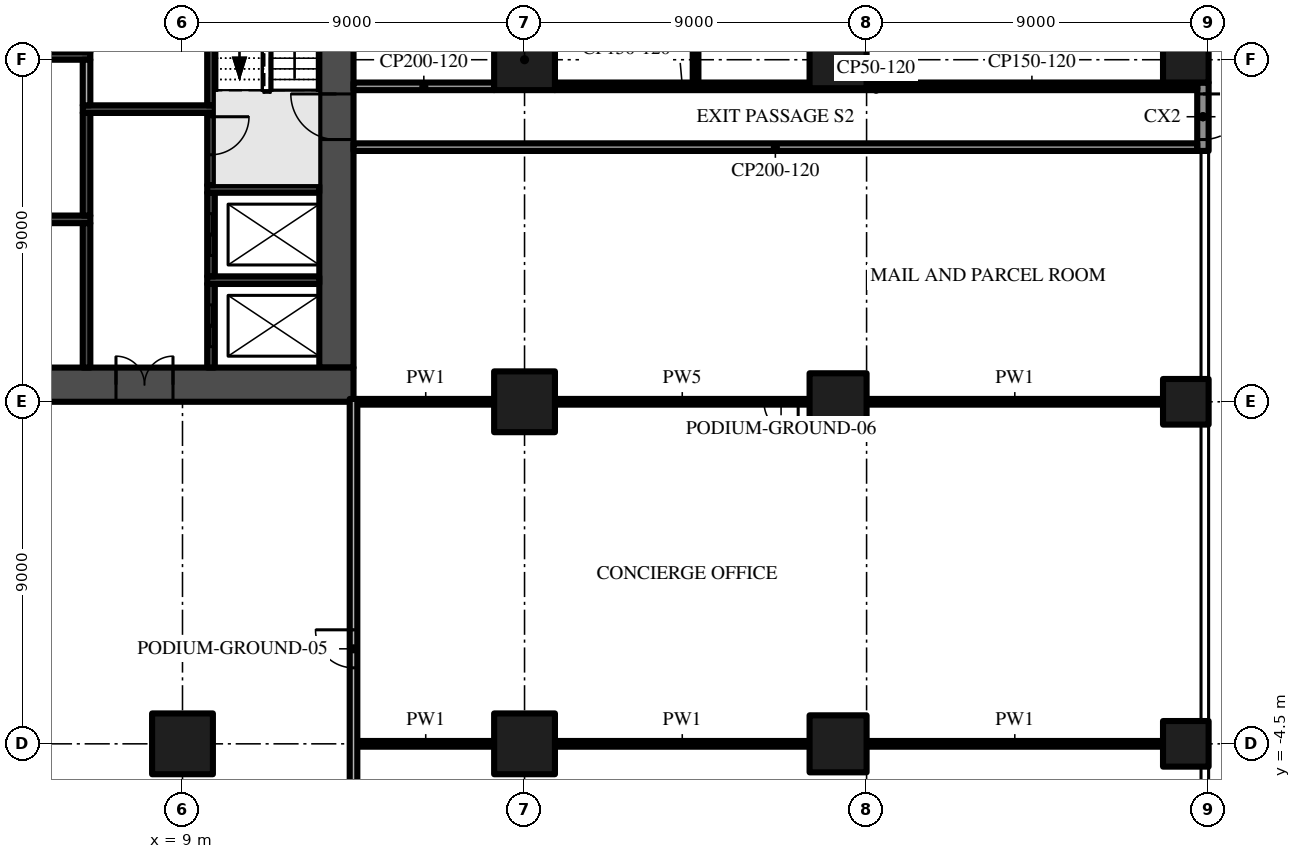
"""IFC4 building model, lengths in metres.
Left out: names, types, materials, properties, quantities, classifications, styles, units other than length and angle.
Written with IfcOpenShell. Run it as: python <this file> out.ifc"""

import sys

from ifc_helpers import new_model, si_unit, direction, frame, frame_2d, origin, origin_2d, place, context, subcontext, project, spatial, rectangle, extrude, element, fill, save


model = new_model("IFC4")
c1 = context("Model", 3, precision=1e-05, world=origin(), true_north=direction((0.0, 1.0)))
c2 = subcontext(c1, "Body", "Model", "MODEL_VIEW")
j1 = project(units=[si_unit("LENGTHUNIT", "METRE"), si_unit("PLANEANGLEUNIT", "RADIAN")], contexts=[c1])
p1 = place(None, origin())
s1 = spatial("IfcSite", under=j1, at=p1, CompositionType="ELEMENT")
p2 = place(p1, origin())
s2 = spatial("IfcBuilding", under=s1, at=p2, CompositionType="ELEMENT")
p3 = place(p2, origin())
s3 = spatial("IfcBuildingStorey", under=s2, at=p3, CompositionType="ELEMENT", Elevation=0.0)
p4 = place(p3, frame((-13.5, 4.95, -2.2), z_axis=(0.0, 0.0, 1.0), x_axis=(1.0, 0.0, 0.0)))
e1 = element("IfcWall", 1, at=p4, inside=s3, PredefinedType="SHEAR", context=c2, shape_type="SweptSolid", body=[
    extrude(rectangle(XDim=27.0, YDim=0.9, at=frame_2d((13.5, 0.0))), origin(), (0.0, 0.0, 1.0), 7.8),
])
p5 = place(p4, frame((12.0, 0.0, 2.2)))
e2 = element("IfcOpeningElement", 2, at=p5, cuts=e1, PredefinedType="OPENING", context=c2, shape_type="SweptSolid", body=[
    extrude(rectangle(XDim=3.0, YDim=2.4, at=frame_2d((1.5, 1.2))), frame((0.0, 0.46, 0.0), z_axis=(0.0, -1.0, 0.0), x_axis=(1.0, 0.0, 0.0)), (0.0, 0.0, 1.0), 0.92),
])
p6 = place(p4, frame((4.9, 0.0, 2.2)))
e3 = element("IfcOpeningElement", 3, at=p6, cuts=e1, PredefinedType="OPENING", context=c2, shape_type="SweptSolid", body=[
    extrude(rectangle(XDim=1.2, YDim=2.2, at=frame_2d((0.6, 1.1))), frame((0.0, 0.46, 0.0), z_axis=(0.0, -1.0, 0.0), x_axis=(1.0, 0.0, 0.0)), (0.0, 0.0, 1.0), 0.92),
])
p7 = place(p4, frame((20.75, 0.0, 2.2)))
e4 = element("IfcOpeningElement", 4, at=p7, cuts=e1, PredefinedType="OPENING", context=c2, shape_type="SweptSolid", body=[
    extrude(rectangle(XDim=1.5, YDim=2.2, at=frame_2d((0.75, 1.1))), frame((0.0, 0.46, 0.0), z_axis=(0.0, -1.0, 0.0), x_axis=(1.0, 0.0, 0.0)), (0.0, 0.0, 1.0), 0.92),
])
p8 = place(p4, frame((17.4, 0.0, 2.2)))
e5 = element("IfcOpeningElement", 5, at=p8, cuts=e1, PredefinedType="OPENING", context=c2, shape_type="SweptSolid", body=[
    extrude(rectangle(XDim=1.2, YDim=2.2, at=frame_2d((0.6, 1.1))), frame((0.0, 0.46, 0.0), z_axis=(0.0, -1.0, 0.0), x_axis=(1.0, 0.0, 0.0)), (0.0, 0.0, 1.0), 0.92),
])
p9 = place(p3, frame((13.05, 5.4, -2.2), z_axis=(0.0, 0.0, 1.0), x_axis=(0.0, 1.0, 0.0)))
e6 = element("IfcWall", 6, at=p9, inside=s3, PredefinedType="SHEAR", context=c2, shape_type="SweptSolid", body=[
    extrude(rectangle(XDim=16.2, YDim=0.9, at=frame_2d((8.1, 0.0))), origin(), (0.0, 0.0, 1.0), 7.8),
])
p10 = place(p9, frame((6.0, 0.0, 2.2)))
e7 = element("IfcOpeningElement", 7, at=p10, cuts=e6, PredefinedType="OPENING", context=c2, shape_type="SweptSolid", body=[
    extrude(rectangle(XDim=1.2, YDim=2.2, at=frame_2d((0.6, 1.1))), frame((0.0, 0.46, 0.0), z_axis=(0.0, -1.0, 0.0), x_axis=(1.0, 0.0, 0.0)), (0.0, 0.0, 1.0), 0.92),
])
for number, where, z_axis, x_axis in (
    (8, (35.4, -4.5, 0.0), (0.0, 0.0, 1.0), (1.0, 0.0, 0.0)),
    (9, (35.4, 13.5, 0.0), (0.0, 0.0, 1.0), (1.0, 0.0, 0.0)),
    (10, (35.4, 4.5, 0.0), (0.0, 0.0, 1.0), (1.0, 0.0, 0.0)),
):
    element("IfcColumn", number, at=place(p3, frame(where, z_axis=z_axis, x_axis=x_axis)), inside=s3, PredefinedType="COLUMN", context=c2, shape_type="SweptSolid", body=[
        extrude(rectangle(XDim=1.2, YDim=1.2, at=origin_2d()), origin(), (0.0, 0.0, 1.0), 5.6),
    ])
for number, where, z_axis, x_axis in (
    (11, (18.0, -4.5, 0.0), (0.0, 0.0, 1.0), (1.0, 0.0, 0.0)),
    (12, (18.0, 13.5, 0.0), (0.0, 0.0, 1.0), (1.0, 0.0, 0.0)),
    (13, (18.0, 4.5, 0.0), (0.0, 0.0, 1.0), (1.0, 0.0, 0.0)),
):
    element("IfcColumn", number, at=place(p3, frame(where, z_axis=z_axis, x_axis=x_axis)), inside=s3, PredefinedType="COLUMN", context=c2, shape_type="SweptSolid", body=[
        extrude(rectangle(XDim=1.6, YDim=1.6, at=origin_2d()), origin(), (0.0, 0.0, 1.0), 5.6),
    ])
for number, where, z_axis, x_axis in (
    (14, (26.25, -4.5, 0.0), (0.0, 0.0, 1.0), (1.0, 0.0, 0.0)),
    (15, (26.25, 13.5, 0.0), (0.0, 0.0, 1.0), (1.0, 0.0, 0.0)),
    (16, (26.25, 4.5, 0.0), (0.0, 0.0, 1.0), (1.0, 0.0, 0.0)),
):
    element("IfcColumn", number, at=place(p3, frame(where, z_axis=z_axis, x_axis=x_axis)), inside=s3, PredefinedType="COLUMN", context=c2, shape_type="SweptSolid", body=[
        extrude(rectangle(XDim=1.5, YDim=1.5, at=origin_2d()), origin(), (0.0, 0.0, 1.0), 5.6),
    ])
p11 = place(p3, frame((9.0, -4.5, 0.0), z_axis=(0.0, 0.0, 1.0), x_axis=(1.0, 0.0, 0.0)))
e17 = element("IfcColumn", 17, at=p11, inside=s3, PredefinedType="COLUMN", context=c2, shape_type="SweptSolid", body=[
    extrude(rectangle(XDim=1.6, YDim=1.6, at=origin_2d()), origin(), (0.0, 0.0, 1.0), 5.6),
])
for number, where, z_axis, x_axis in (
    (18, (1.5, 9.3, -0.4), (0.0, 0.0, 1.0), (1.0, 0.0, 0.0)),
    (19, (1.5, 13.6, -0.4), (0.0, 0.0, 1.0), (1.0, 0.0, 0.0)),
):
    element("IfcWall", number, at=place(p3, frame(where, z_axis=z_axis, x_axis=x_axis)), inside=s3, PredefinedType="SHEAR", context=c2, shape_type="SweptSolid", body=[
        extrude(rectangle(XDim=5.075, YDim=0.2, at=frame_2d((2.538, 0.0))), origin(), (0.0, 0.0, 1.0), 6.0),
    ])
p12 = place(p3, frame((6.475, 5.4, -0.4), z_axis=(0.0, 0.0, 1.0), x_axis=(0.0, 1.0, 0.0)))
e20 = element("IfcWall", 20, at=p12, inside=s3, PredefinedType="SHEAR", context=c2, shape_type="SweptSolid", body=[
    extrude(rectangle(XDim=3.8, YDim=0.2, at=frame_2d((1.9, 0.0))), origin(), (0.0, 0.0, 1.0), 6.0),
])
p13 = place(p3, frame((6.475, 9.4, -0.4), z_axis=(0.0, 0.0, 1.0), x_axis=(0.0, 1.0, 0.0)))
e21 = element("IfcWall", 21, at=p13, inside=s3, PredefinedType="SHEAR", context=c2, shape_type="SweptSolid", body=[
    extrude(rectangle(XDim=2.7, YDim=0.2, at=frame_2d((1.35, 0.0))), origin(), (0.0, 0.0, 1.0), 6.0),
])
p14 = place(p3, frame((6.375, 12.2, -0.4), z_axis=(0.0, 0.0, 1.0), x_axis=(1.0, 0.0, 0.0)))
e22 = element("IfcWall", 22, at=p14, inside=s3, PredefinedType="SHEAR", context=c2, shape_type="SweptSolid", body=[
    extrude(rectangle(XDim=3.475, YDim=0.2, at=frame_2d((1.738, 0.0))), origin(), (0.0, 0.0, 1.0), 6.0),
])
p15 = place(p3, frame((6.475, 12.3, 0.0), z_axis=(0.0, 0.0, 1.0), x_axis=(0.0, 1.0, 0.0)))
e23 = element("IfcWall", 23, at=p15, inside=s3, PredefinedType="PARTITIONING", context=c2, shape_type="SweptSolid", body=[
    extrude(rectangle(XDim=1.2, YDim=0.2, at=frame_2d((0.6, 0.0))), origin(), (0.0, 0.0, 1.0), 5.6),
])
p16 = place(p3, frame((9.75, 5.4, -0.4), z_axis=(0.0, 0.0, 1.0), x_axis=(0.0, 1.0, 0.0)))
e24 = element("IfcWall", 24, at=p16, inside=s3, PredefinedType="SHEAR", context=c2, shape_type="SweptSolid", body=[
    extrude(rectangle(XDim=2.2, YDim=0.2, at=frame_2d((1.1, 0.0))), origin(), (0.0, 0.0, 1.0), 6.0),
])
p17 = place(p16, frame((0.55, 0.0, 0.4)))
e25 = element("IfcOpeningElement", 25, at=p17, cuts=e24, PredefinedType="OPENING", context=c2, shape_type="SweptSolid", body=[
    extrude(rectangle(XDim=1.1, YDim=2.1, at=frame_2d((0.55, 1.05))), frame((0.0, 0.11, 0.0), z_axis=(0.0, -1.0, 0.0), x_axis=(1.0, 0.0, 0.0)), (0.0, 0.0, 1.0), 0.22),
])
p18 = place(p3, frame((9.65, 7.7, -0.4), z_axis=(0.0, 0.0, 1.0), x_axis=(1.0, 0.0, 0.0)))
e26 = element("IfcWall", 26, at=p18, inside=s3, PredefinedType="SHEAR", context=c2, shape_type="SweptSolid", body=[
    extrude(rectangle(XDim=2.95, YDim=0.2, at=frame_2d((1.475, 0.0))), origin(), (0.0, 0.0, 1.0), 6.0),
])
p19 = place(p3, frame((9.75, 7.8, -0.4), z_axis=(0.0, 0.0, 1.0), x_axis=(0.0, 1.0, 0.0)))
e27 = element("IfcWall", 27, at=p19, inside=s3, PredefinedType="SHEAR", context=c2, shape_type="SweptSolid", body=[
    extrude(rectangle(XDim=2.2, YDim=0.2, at=frame_2d((1.1, 0.0))), origin(), (0.0, 0.0, 1.0), 6.0),
])
p20 = place(p19, frame((0.55, 0.0, 0.4)))
e28 = element("IfcOpeningElement", 28, at=p20, cuts=e27, PredefinedType="OPENING", context=c2, shape_type="SweptSolid", body=[
    extrude(rectangle(XDim=1.1, YDim=2.1, at=frame_2d((0.55, 1.05))), frame((0.0, 0.11, 0.0), z_axis=(0.0, -1.0, 0.0), x_axis=(1.0, 0.0, 0.0)), (0.0, 0.0, 1.0), 0.22),
])
p21 = place(p3, frame((9.65, 10.1, -0.4), z_axis=(0.0, 0.0, 1.0), x_axis=(1.0, 0.0, 0.0)))
e29 = element("IfcWall", 29, at=p21, inside=s3, PredefinedType="SHEAR", context=c2, shape_type="SweptSolid", body=[
    extrude(rectangle(XDim=2.95, YDim=0.2, at=frame_2d((1.475, 0.0))), origin(), (0.0, 0.0, 1.0), 6.0),
])
p22 = place(p3, frame((9.75, 12.1, -0.4), z_axis=(0.0, 0.0, 1.0), x_axis=(0.0, -1.0, 0.0)))
e30 = element("IfcWall", 30, at=p22, inside=s3, PredefinedType="SHEAR", context=c2, shape_type="SweptSolid", body=[
    extrude(rectangle(XDim=1.9, YDim=0.2, at=frame_2d((0.95, 0.0))), origin(), (0.0, 0.0, 1.0), 6.0),
])
p23 = place(p22, frame((0.1, 0.0, 0.4)))
e31 = element("IfcOpeningElement", 31, at=p23, cuts=e30, PredefinedType="OPENING", context=c2, shape_type="SweptSolid", body=[
    extrude(rectangle(XDim=1.0, YDim=2.2, at=frame_2d((0.5, 1.1))), frame((0.0, 0.11, 0.0), z_axis=(0.0, -1.0, 0.0), x_axis=(1.0, 0.0, 0.0)), (0.0, 0.0, 1.0), 0.22),
])
p24 = place(p3, frame((9.75, 12.3, -0.4), z_axis=(0.0, 0.0, 1.0), x_axis=(0.0, 1.0, 0.0)))
e32 = element("IfcWall", 32, at=p24, inside=s3, PredefinedType="SHEAR", context=c2, shape_type="SweptSolid", body=[
    extrude(rectangle(XDim=3.6, YDim=0.2, at=frame_2d((1.8, 0.0))), origin(), (0.0, 0.0, 1.0), 6.0),
])
p25 = place(p3, frame((13.5, 11.2, 0.0), z_axis=(0.0, 0.0, 1.0), x_axis=(1.0, 0.0, 0.0)))
e33 = element("IfcWall", 33, at=p25, inside=s3, PredefinedType="PARTITIONING", context=c2, shape_type="SweptSolid", body=[
    extrude(rectangle(XDim=22.2, YDim=0.2, at=frame_2d((11.1, 0.0))), origin(), (0.0, 0.0, 1.0), 5.6),
])
p26 = place(p3, frame((13.5, 12.8, 0.0), z_axis=(0.0, 0.0, 1.0), x_axis=(1.0, 0.0, 0.0)))
e34 = element("IfcWall", 34, at=p26, inside=s3, PredefinedType="PARTITIONING", context=c2, shape_type="SweptSolid", body=[
    extrude(rectangle(XDim=3.7, YDim=0.2, at=frame_2d((1.85, 0.0))), origin(), (0.0, 0.0, 1.0), 5.6),
])
p27 = place(p3, frame((18.8, 12.725, 0.0), z_axis=(0.0, 0.0, 1.0), x_axis=(1.0, 0.0, 0.0)))
e35 = element("IfcWall", 35, at=p27, inside=s3, PredefinedType="PARTITIONING", context=c2, shape_type="SweptSolid", body=[
    extrude(rectangle(XDim=16.9, YDim=0.05, at=frame_2d((8.45, 0.0))), origin(), (0.0, 0.0, 1.0), 5.6),
])
p28 = place(p3, frame((18.8, 12.825, 0.0), z_axis=(0.0, 0.0, 1.0), x_axis=(1.0, 0.0, 0.0)))
e36 = element("IfcWall", 36, at=p28, inside=s3, PredefinedType="PARTITIONING", context=c2, shape_type="SweptSolid", body=[
    extrude(rectangle(XDim=6.7, YDim=0.15, at=frame_2d((3.35, 0.0))), origin(), (0.0, 0.0, 1.0), 5.6),
])
p29 = place(p3, frame((27.0, 12.825, 0.0), z_axis=(0.0, 0.0, 1.0), x_axis=(1.0, 0.0, 0.0)))
e37 = element("IfcWall", 37, at=p29, inside=s3, PredefinedType="PARTITIONING", context=c2, shape_type="SweptSolid", body=[
    extrude(rectangle(XDim=8.7, YDim=0.15, at=frame_2d((4.35, 0.0))), origin(), (0.0, 0.0, 1.0), 5.6),
])
p30 = place(p3, frame((35.85, 12.9, 0.0), z_axis=(0.0, 0.0, 1.0), x_axis=(0.0, -1.0, 0.0)))
e38 = element("IfcWall", 38, at=p30, inside=s3, PredefinedType="PARTITIONING", context=c2, shape_type="SweptSolid", body=[
    extrude(rectangle(XDim=1.8, YDim=0.3, at=frame_2d((0.9, 0.0))), origin(), (0.0, 0.0, 1.0), 5.6),
])
p31 = place(p30, frame((0.3, 0.0, 0.0)))
e39 = element("IfcOpeningElement", 39, at=p31, cuts=e38, PredefinedType="OPENING", context=c2, shape_type="SweptSolid", body=[
    extrude(rectangle(XDim=1.2, YDim=2.2, at=frame_2d((0.6, 1.1))), frame((0.0, 0.16, 0.0), z_axis=(0.0, -1.0, 0.0), x_axis=(1.0, 0.0, 0.0)), (0.0, 0.0, 1.0), 0.32),
])
p32 = place(p3, frame((13.6, -4.5, 0.0), z_axis=(0.0, 0.0, 1.0), x_axis=(1.0, 0.0, 0.0)))
e40 = element("IfcWall", 40, at=p32, inside=s3, PredefinedType="PARTITIONING", context=c2, shape_type="SweptSolid", body=[
    extrude(rectangle(XDim=3.6, YDim=0.15, at=frame_2d((1.8, 0.0))), origin(), (0.0, 0.0, 1.0), 5.6),
])
p33 = place(p3, frame((18.8, -4.5, 0.0), z_axis=(0.0, 0.0, 1.0), x_axis=(1.0, 0.0, 0.0)))
e41 = element("IfcWall", 41, at=p33, inside=s3, PredefinedType="PARTITIONING", context=c2, shape_type="SweptSolid", body=[
    extrude(rectangle(XDim=6.7, YDim=0.15, at=frame_2d((3.35, 0.0))), origin(), (0.0, 0.0, 1.0), 5.6),
])
p34 = place(p3, frame((27.0, -4.5, 0.0), z_axis=(0.0, 0.0, 1.0), x_axis=(1.0, 0.0, 0.0)))
e42 = element("IfcWall", 42, at=p34, inside=s3, PredefinedType="PARTITIONING", context=c2, shape_type="SweptSolid", body=[
    extrude(rectangle(XDim=7.8, YDim=0.15, at=frame_2d((3.9, 0.0))), origin(), (0.0, 0.0, 1.0), 5.6),
])
p35 = place(p3, frame((13.6, 4.5, 0.0), z_axis=(0.0, 0.0, 1.0), x_axis=(1.0, 0.0, 0.0)))
e43 = element("IfcWall", 43, at=p35, inside=s3, PredefinedType="PARTITIONING", context=c2, shape_type="SweptSolid", body=[
    extrude(rectangle(XDim=3.6, YDim=0.15, at=frame_2d((1.8, 0.0))), origin(), (0.0, 0.0, 1.0), 5.6),
])
p36 = place(p3, frame((25.5, 4.5, 0.0), z_axis=(0.0, 0.0, 1.0), x_axis=(-1.0, 0.0, 0.0)))
e44 = element("IfcWall", 44, at=p36, inside=s3, PredefinedType="PARTITIONING", context=c2, shape_type="SweptSolid", body=[
    extrude(rectangle(XDim=6.7, YDim=0.15, at=frame_2d((3.35, 0.0))), origin(), (0.0, 0.0, 1.0), 5.6),
])
p37 = place(p36, frame((0.3, 0.0, 0.0)))
e45 = element("IfcOpeningElement", 45, at=p37, cuts=e44, PredefinedType="OPENING", context=c2, shape_type="SweptSolid", body=[
    extrude(rectangle(XDim=0.9, YDim=2.1, at=frame_2d((0.45, 1.05))), frame((0.0, 0.085, 0.0), z_axis=(0.0, -1.0, 0.0), x_axis=(1.0, 0.0, 0.0)), (0.0, 0.0, 1.0), 0.17),
])
p38 = place(p3, frame((27.0, 4.5, 0.0), z_axis=(0.0, 0.0, 1.0), x_axis=(1.0, 0.0, 0.0)))
e46 = element("IfcWall", 46, at=p38, inside=s3, PredefinedType="PARTITIONING", context=c2, shape_type="SweptSolid", body=[
    extrude(rectangle(XDim=7.8, YDim=0.15, at=frame_2d((3.9, 0.0))), origin(), (0.0, 0.0, 1.0), 5.6),
])
p39 = place(p3, frame((13.5, -27.0, 0.0), z_axis=(0.0, 0.0, 1.0), x_axis=(0.0, 1.0, 0.0)))
e47 = element("IfcWall", 47, at=p39, inside=s3, PredefinedType="PARTITIONING", context=c2, shape_type="SweptSolid", body=[
    extrude(rectangle(XDim=31.575, YDim=0.2, at=frame_2d((15.787, 0.0))), origin(), (0.0, 0.0, 1.0), 5.6),
])
p40 = place(p39, frame((6.6, 0.0, 0.0)))
e48 = element("IfcOpeningElement", 48, at=p40, cuts=e47, PredefinedType="OPENING", context=c2, shape_type="SweptSolid", body=[
    extrude(rectangle(XDim=1.2, YDim=2.4, at=frame_2d((0.6, 1.2))), frame((0.0, 0.11, 0.0), z_axis=(0.0, -1.0, 0.0), x_axis=(1.0, 0.0, 0.0)), (0.0, 0.0, 1.0), 0.22),
])
p41 = place(p39, frame((15.15, 0.0, 0.0)))
e49 = element("IfcOpeningElement", 49, at=p41, cuts=e47, PredefinedType="OPENING", context=c2, shape_type="SweptSolid", body=[
    extrude(rectangle(XDim=1.2, YDim=2.4, at=frame_2d((0.6, 1.2))), frame((0.0, 0.11, 0.0), z_axis=(0.0, -1.0, 0.0), x_axis=(1.0, 0.0, 0.0)), (0.0, 0.0, 1.0), 0.22),
])
p42 = place(p39, frame((24.5, 0.0, 0.0)))
e50 = element("IfcOpeningElement", 50, at=p42, cuts=e47, PredefinedType="OPENING", context=c2, shape_type="SweptSolid", body=[
    extrude(rectangle(XDim=1.0, YDim=2.4, at=frame_2d((0.5, 1.2))), frame((0.0, 0.11, 0.0), z_axis=(0.0, -1.0, 0.0), x_axis=(1.0, 0.0, 0.0)), (0.0, 0.0, 1.0), 0.22),
])
p43 = place(p3, frame((22.5, 12.9, 0.0), z_axis=(0.0, 0.0, 1.0), x_axis=(0.0, 1.0, 0.0)))
e51 = element("IfcWall", 51, at=p43, inside=s3, PredefinedType="PARTITIONING", context=c2, shape_type="SweptSolid", body=[
    extrude(rectangle(XDim=4.35, YDim=0.15, at=frame_2d((2.175, 0.0))), origin(), (0.0, 0.0, 1.0), 5.6),
])
p44 = place(p10, frame((1.2, 0.0, 0.0), z_axis=(0.0, 0.0, 1.0), x_axis=(-1.0, 0.0, 0.0)))
e52 = element("IfcDoor", 52, at=p44, inside=s3, OperationType="SINGLE_SWING_LEFT", PredefinedType="DOOR", context=c2, shape_type="SweptSolid", body=[
    extrude(rectangle(XDim=1.2, YDim=2.2, at=frame_2d((0.6, 1.1))), frame((0.0, 0.025, 0.0), z_axis=(0.0, -1.0, 0.0), x_axis=(1.0, 0.0, 0.0)), (0.0, 0.0, 1.0), 0.05),
])
fill(e7, e52)
p45 = place(p7, frame((1.5, 0.0, 0.0), z_axis=(0.0, 0.0, 1.0), x_axis=(-1.0, 0.0, 0.0)))
e53 = element("IfcDoor", 53, at=p45, inside=s3, OperationType="DOUBLE_DOOR_SINGLE_SWING", PredefinedType="DOOR", context=c2, shape_type="SweptSolid", body=[
    extrude(rectangle(XDim=1.5, YDim=2.2, at=frame_2d((0.75, 1.1))), frame((0.0, 0.025, 0.0), z_axis=(0.0, -1.0, 0.0), x_axis=(1.0, 0.0, 0.0)), (0.0, 0.0, 1.0), 0.05),
])
fill(e4, e53)
p46 = place(p23, origin())
e54 = element("IfcDoor", 54, at=p46, inside=s3, OperationType="SINGLE_SWING_LEFT", PredefinedType="DOOR", context=c2, shape_type="SweptSolid", body=[
    extrude(rectangle(XDim=1.0, YDim=2.2, at=frame_2d((0.5, 1.1))), frame((0.0, 0.025, 0.0), z_axis=(0.0, -1.0, 0.0), x_axis=(1.0, 0.0, 0.0)), (0.0, 0.0, 1.0), 0.05),
])
fill(e31, e54)
p47 = place(p17, origin())
e55 = element("IfcDoor", 55, at=p47, inside=s3, OperationType="SLIDING_TO_RIGHT", PredefinedType="DOOR", context=c2, shape_type="SweptSolid", body=[
    extrude(rectangle(XDim=1.1, YDim=2.1, at=frame_2d((0.55, 1.05))), frame((0.0, 0.025, 0.0), z_axis=(0.0, -1.0, 0.0), x_axis=(1.0, 0.0, 0.0)), (0.0, 0.0, 1.0), 0.05),
])
fill(e25, e55)
p48 = place(p20, origin())
e56 = element("IfcDoor", 56, at=p48, inside=s3, OperationType="SLIDING_TO_RIGHT", PredefinedType="DOOR", context=c2, shape_type="SweptSolid", body=[
    extrude(rectangle(XDim=1.1, YDim=2.1, at=frame_2d((0.55, 1.05))), frame((0.0, 0.025, 0.0), z_axis=(0.0, -1.0, 0.0), x_axis=(1.0, 0.0, 0.0)), (0.0, 0.0, 1.0), 0.05),
])
fill(e28, e56)
p49 = place(p31, origin())
e57 = element("IfcDoor", 57, at=p49, inside=s3, OperationType="SINGLE_SWING_LEFT", PredefinedType="DOOR", context=c2, shape_type="SweptSolid", body=[
    extrude(rectangle(XDim=1.2, YDim=2.2, at=frame_2d((0.6, 1.1))), frame((0.0, 0.025, 0.0), z_axis=(0.0, -1.0, 0.0), x_axis=(1.0, 0.0, 0.0)), (0.0, 0.0, 1.0), 0.05),
])
fill(e39, e57)
p50 = place(p42, origin())
e58 = element("IfcDoor", 58, at=p50, inside=s3, OperationType="SINGLE_SWING_RIGHT", PredefinedType="DOOR", context=c2, shape_type="SweptSolid", body=[
    extrude(rectangle(XDim=1.0, YDim=2.4, at=frame_2d((0.5, 1.2))), frame((0.0, 0.025, 0.0), z_axis=(0.0, -1.0, 0.0), x_axis=(1.0, 0.0, 0.0)), (0.0, 0.0, 1.0), 0.05),
])
fill(e50, e58)
p51 = place(p37, origin())
e59 = element("IfcDoor", 59, at=p51, inside=s3, OperationType="SINGLE_SWING_LEFT", PredefinedType="DOOR", context=c2, shape_type="SweptSolid", body=[
    extrude(rectangle(XDim=0.9, YDim=2.1, at=frame_2d((0.45, 1.05))), frame((0.0, 0.025, 0.0), z_axis=(0.0, -1.0, 0.0), x_axis=(1.0, 0.0, 0.0)), (0.0, 0.0, 1.0), 0.05),
])
fill(e45, e59)
save(model, sys.argv[1])
